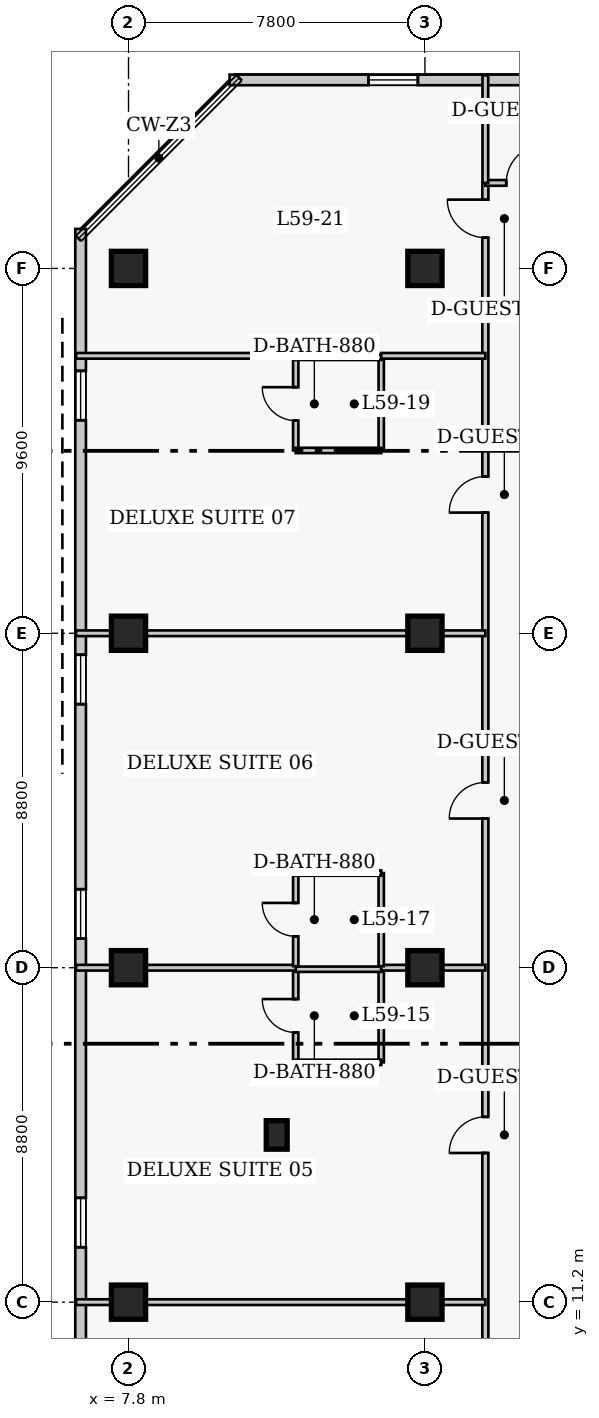
"""IFC4 building model, lengths in metres.
Left out: names, types, materials, properties, quantities, classifications, styles, units other than length and angle.
Written with IfcOpenShell. Run it as: python <this file> out.ifc"""

import sys

from ifc_helpers import new_model, si_unit, direction, frame, frame_2d, origin, origin_2d, place, context, subcontext, project, spatial, rectangle, extrude, element, fill, save


model = new_model("IFC4")
c1 = context("Model", 3, precision=1e-05, world=origin(), true_north=direction((0.0, 1.0)))
c2 = subcontext(c1, "Body", "Model", "MODEL_VIEW")
j1 = project(units=[si_unit("LENGTHUNIT", "METRE"), si_unit("PLANEANGLEUNIT", "RADIAN")], contexts=[c1])
p1 = place(None, origin())
s1 = spatial("IfcSite", under=j1, at=p1, CompositionType="ELEMENT")
p2 = place(p1, origin())
s2 = spatial("IfcBuilding", under=s1, at=p2, CompositionType="ELEMENT")
p3 = place(p2, frame((0.0, 0.0, 236.5)))
s3 = spatial("IfcBuildingStorey", under=s2, at=p3, CompositionType="ELEMENT", Elevation=236.5)
for number, where, z_axis, x_axis in (
    (1, (7.8, 11.2, 0.0), (0.0, 0.0, 1.0), (1.0, 0.0, 0.0)),
    (2, (7.8, 20.0, 0.0), (0.0, 0.0, 1.0), (1.0, 0.0, 0.0)),
    (3, (7.8, 28.8, 0.0), (0.0, 0.0, 1.0), (1.0, 0.0, 0.0)),
    (4, (7.8, 38.4, 0.0), (0.0, 0.0, 1.0), (1.0, 0.0, 0.0)),
    (5, (15.6, 11.2, 0.0), (0.0, 0.0, 1.0), (1.0, 0.0, 0.0)),
    (6, (15.6, 20.0, 0.0), (0.0, 0.0, 1.0), (1.0, 0.0, 0.0)),
    (7, (15.6, 28.8, 0.0), (0.0, 0.0, 1.0), (1.0, 0.0, 0.0)),
    (8, (15.6, 38.4, 0.0), (0.0, 0.0, 1.0), (1.0, 0.0, 0.0)),
):
    element("IfcColumn", number, at=place(p3, frame(where, z_axis=z_axis, x_axis=x_axis)), inside=s3, PredefinedType="COLUMN", context=c2, shape_type="SweptSolid", body=[
        extrude(rectangle(XDim=0.9, YDim=0.9, at=origin_2d()), origin(), (0.0, 0.0, 1.0), 3.9),
    ])
p4 = place(p3, frame((11.7, 15.6, 0.0), z_axis=(0.0, 0.0, 1.0), x_axis=(1.0, 0.0, 0.0)))
e9 = element("IfcColumn", 9, at=p4, inside=s3, PredefinedType="PILASTER", context=c2, shape_type="SweptSolid", body=[
    extrude(rectangle(XDim=0.55, YDim=0.75, at=origin_2d()), origin(), (0.0, 0.0, 1.0), 3.9),
])
p5 = place(p3, frame((36.29, 43.36, 0.0), z_axis=(0.0, 0.0, 1.0), x_axis=(-1.0, 0.0, 0.0)))
e10 = element("IfcWall", 10, at=p5, inside=s3, PredefinedType="SOLIDWALL", context=c2, shape_type="SweptSolid", body=[
    extrude(rectangle(XDim=25.83, YDim=0.28, at=frame_2d((12.915, 0.0))), origin(), (0.0, 0.0, 1.0), 3.52),
])
p6 = place(p5, frame((3.005, 0.0, 0.85)))
e11 = element("IfcOpeningElement", 11, at=p6, cuts=e10, PredefinedType="OPENING", context=c2, shape_type="SweptSolid", body=[
    extrude(rectangle(XDim=1.3, YDim=1.7, at=frame_2d((0.65, 0.85))), frame((0.0, 0.15, 0.0), z_axis=(0.0, -1.0, 0.0), x_axis=(1.0, 0.0, 0.0)), (0.0, 0.0, 1.0), 0.3),
])
p7 = place(p5, frame((12.265, 0.0, 0.85)))
e12 = element("IfcOpeningElement", 12, at=p7, cuts=e10, PredefinedType="OPENING", context=c2, shape_type="SweptSolid", body=[
    extrude(rectangle(XDim=1.3, YDim=1.7, at=frame_2d((0.65, 0.85))), frame((0.0, 0.15, 0.0), z_axis=(0.0, -1.0, 0.0), x_axis=(1.0, 0.0, 0.0)), (0.0, 0.0, 1.0), 0.3),
])
p8 = place(p5, frame((20.875, 0.0, 0.85)))
e13 = element("IfcOpeningElement", 13, at=p8, cuts=e10, PredefinedType="OPENING", context=c2, shape_type="SweptSolid", body=[
    extrude(rectangle(XDim=1.3, YDim=1.7, at=frame_2d((0.65, 0.85))), frame((0.0, 0.15, 0.0), z_axis=(0.0, -1.0, 0.0), x_axis=(1.0, 0.0, 0.0)), (0.0, 0.0, 1.0), 0.3),
])
p9 = place(p3, frame((6.54, 39.44, 0.0), z_axis=(0.0, 0.0, 1.0), x_axis=(0.0, -1.0, 0.0)))
e14 = element("IfcWall", 14, at=p9, inside=s3, PredefinedType="SOLIDWALL", context=c2, shape_type="SweptSolid", body=[
    extrude(rectangle(XDim=29.88, YDim=0.28, at=frame_2d((14.94, 0.0))), origin(), (0.0, 0.0, 1.0), 3.52),
])
p10 = place(p9, frame((3.735, 0.0, 0.85)))
e15 = element("IfcOpeningElement", 15, at=p10, cuts=e14, PredefinedType="OPENING", context=c2, shape_type="SweptSolid", body=[
    extrude(rectangle(XDim=1.3, YDim=1.7, at=frame_2d((0.65, 0.85))), frame((0.0, 0.15, 0.0), z_axis=(0.0, -1.0, 0.0), x_axis=(1.0, 0.0, 0.0)), (0.0, 0.0, 1.0), 0.3),
])
p11 = place(p9, frame((11.205, 0.0, 0.85)))
e16 = element("IfcOpeningElement", 16, at=p11, cuts=e14, PredefinedType="OPENING", context=c2, shape_type="SweptSolid", body=[
    extrude(rectangle(XDim=1.3, YDim=1.7, at=frame_2d((0.65, 0.85))), frame((0.0, 0.15, 0.0), z_axis=(0.0, -1.0, 0.0), x_axis=(1.0, 0.0, 0.0)), (0.0, 0.0, 1.0), 0.3),
])
p12 = place(p9, frame((17.375, 0.0, 0.85)))
e17 = element("IfcOpeningElement", 17, at=p12, cuts=e14, PredefinedType="OPENING", context=c2, shape_type="SweptSolid", body=[
    extrude(rectangle(XDim=1.3, YDim=1.7, at=frame_2d((0.65, 0.85))), frame((0.0, 0.15, 0.0), z_axis=(0.0, -1.0, 0.0), x_axis=(1.0, 0.0, 0.0)), (0.0, 0.0, 1.0), 0.3),
])
p13 = place(p9, frame((25.495, 0.0, 0.85)))
e18 = element("IfcOpeningElement", 18, at=p13, cuts=e14, PredefinedType="OPENING", context=c2, shape_type="SweptSolid", body=[
    extrude(rectangle(XDim=1.3, YDim=1.7, at=frame_2d((0.65, 0.85))), frame((0.0, 0.15, 0.0), z_axis=(0.0, -1.0, 0.0), x_axis=(1.0, 0.0, 0.0)), (0.0, 0.0, 1.0), 0.3),
])
p14 = place(p3, frame((17.19, 7.55, 0.0), z_axis=(0.0, 0.0, 1.0), x_axis=(0.0, 1.0, 0.0)))
e19 = element("IfcWall", 19, at=p14, inside=s3, PredefinedType="PARTITIONING", context=c2, shape_type="SweptSolid", body=[
    extrude(rectangle(XDim=33.1, YDim=0.16, at=frame_2d((16.55, 0.0))), origin(), (0.0, 0.0, 1.0), 3.52),
])
p15 = place(p14, frame((1.35, 0.0, 0.0)))
e20 = element("IfcOpeningElement", 20, at=p15, cuts=e19, PredefinedType="OPENING", context=c2, shape_type="SweptSolid", body=[
    extrude(rectangle(XDim=0.95, YDim=2.1, at=frame_2d((0.475, 1.05))), frame((0.0, 0.09, 0.0), z_axis=(0.0, -1.0, 0.0), x_axis=(1.0, 0.0, 0.0)), (0.0, 0.0, 1.0), 0.18),
])
p16 = place(p14, frame((7.575, 0.0, 0.0)))
e21 = element("IfcOpeningElement", 21, at=p16, cuts=e19, PredefinedType="OPENING", context=c2, shape_type="SweptSolid", body=[
    extrude(rectangle(XDim=0.95, YDim=2.1, at=frame_2d((0.475, 1.05))), frame((0.0, 0.09, 0.0), z_axis=(0.0, -1.0, 0.0), x_axis=(1.0, 0.0, 0.0)), (0.0, 0.0, 1.0), 0.18),
])
p17 = place(p14, frame((16.375, 0.0, 0.0)))
e22 = element("IfcOpeningElement", 22, at=p17, cuts=e19, PredefinedType="OPENING", context=c2, shape_type="SweptSolid", body=[
    extrude(rectangle(XDim=0.95, YDim=2.1, at=frame_2d((0.475, 1.05))), frame((0.0, 0.09, 0.0), z_axis=(0.0, -1.0, 0.0), x_axis=(1.0, 0.0, 0.0)), (0.0, 0.0, 1.0), 0.18),
])
p18 = place(p14, frame((24.425, 0.0, 0.0)))
e23 = element("IfcOpeningElement", 23, at=p18, cuts=e19, PredefinedType="OPENING", context=c2, shape_type="SweptSolid", body=[
    extrude(rectangle(XDim=0.95, YDim=2.1, at=frame_2d((0.475, 1.05))), frame((0.0, 0.09, 0.0), z_axis=(0.0, -1.0, 0.0), x_axis=(1.0, 0.0, 0.0)), (0.0, 0.0, 1.0), 0.18),
])
p19 = place(p14, frame((31.66, 0.0, 0.0)))
e24 = element("IfcOpeningElement", 24, at=p19, cuts=e19, PredefinedType="OPENING", context=c2, shape_type="SweptSolid", body=[
    extrude(rectangle(XDim=1.0, YDim=2.15, at=frame_2d((0.5, 1.075))), frame((0.0, 0.09, 0.0), z_axis=(0.0, -1.0, 0.0), x_axis=(1.0, 0.0, 0.0)), (0.0, 0.0, 1.0), 0.18),
])
p20 = place(p3, frame((17.19, 40.65, 0.0), z_axis=(0.0, 0.0, 1.0), x_axis=(1.0, 0.0, 0.0)))
e25 = element("IfcWall", 25, at=p20, inside=s3, PredefinedType="PARTITIONING", context=c2, shape_type="SweptSolid", body=[
    extrude(rectangle(XDim=4.91, YDim=0.15, at=frame_2d((2.455, 0.0))), origin(), (0.0, 0.0, 1.0), 3.52),
])
p21 = place(p20, frame((0.55, 0.0, 0.0)))
e26 = element("IfcOpeningElement", 26, at=p21, cuts=e25, PredefinedType="OPENING", context=c2, shape_type="SweptSolid", body=[
    extrude(rectangle(XDim=1.0, YDim=2.15, at=frame_2d((0.5, 1.075))), frame((0.0, 0.085, 0.0), z_axis=(0.0, -1.0, 0.0), x_axis=(1.0, 0.0, 0.0)), (0.0, 0.0, 1.0), 0.17),
])
p22 = place(p3, frame((17.19, 40.65, 0.0), z_axis=(0.0, 0.0, 1.0), x_axis=(0.0, 1.0, 0.0)))
e27 = element("IfcWall", 27, at=p22, inside=s3, PredefinedType="PARTITIONING", context=c2, shape_type="SweptSolid", body=[
    extrude(rectangle(XDim=2.83, YDim=0.15, at=frame_2d((1.415, 0.0))), origin(), (0.0, 0.0, 1.0), 3.52),
])
p23 = place(p3, frame((6.42, 11.2, 0.0), z_axis=(0.0, 0.0, 1.0), x_axis=(1.0, 0.0, 0.0)))
e28 = element("IfcWall", 28, at=p23, inside=s3, PredefinedType="PARTITIONING", context=c2, shape_type="SweptSolid", body=[
    extrude(rectangle(XDim=10.77, YDim=0.15, at=frame_2d((5.385, 0.0))), origin(), (0.0, 0.0, 1.0), 2.748),
])
p24 = place(p3, frame((12.2, 17.51, 0.0), z_axis=(0.0, 0.0, 1.0), x_axis=(0.0, 1.0, 0.0)))
e29 = element("IfcWall", 29, at=p24, inside=s3, PredefinedType="PLUMBINGWALL", context=c2, shape_type="SweptSolid", body=[
    extrude(rectangle(XDim=2.45, YDim=0.14, at=frame_2d((1.225, 0.0))), origin(), (0.0, 0.0, 1.0), 3.52),
])
p25 = place(p24, frame((0.785, 0.0, 0.0)))
e30 = element("IfcOpeningElement", 30, at=p25, cuts=e29, PredefinedType="OPENING", context=c2, shape_type="SweptSolid", body=[
    extrude(rectangle(XDim=0.88, YDim=2.05, at=frame_2d((0.44, 1.025))), frame((0.0, 0.08, 0.0), z_axis=(0.0, -1.0, 0.0), x_axis=(1.0, 0.0, 0.0)), (0.0, 0.0, 1.0), 0.16),
])
p26 = place(p3, frame((14.45, 17.51, 0.0), z_axis=(0.0, 0.0, 1.0), x_axis=(0.0, 1.0, 0.0)))
e31 = element("IfcWall", 31, at=p26, inside=s3, PredefinedType="PLUMBINGWALL", context=c2, shape_type="SweptSolid", body=[
    extrude(rectangle(XDim=2.45, YDim=0.14, at=frame_2d((1.225, 0.0))), origin(), (0.0, 0.0, 1.0), 3.52),
])
p27 = place(p3, frame((12.2, 17.51, 0.0), z_axis=(0.0, 0.0, 1.0), x_axis=(1.0, 0.0, 0.0)))
e32 = element("IfcWall", 32, at=p27, inside=s3, PredefinedType="PLUMBINGWALL", context=c2, shape_type="SweptSolid", body=[
    extrude(rectangle(XDim=2.25, YDim=0.14, at=frame_2d((1.125, 0.0))), origin(), (0.0, 0.0, 1.0), 3.52),
])
p28 = place(p3, frame((12.2, 19.96, 0.0), z_axis=(0.0, 0.0, 1.0), x_axis=(1.0, 0.0, 0.0)))
e33 = element("IfcWall", 33, at=p28, inside=s3, PredefinedType="PLUMBINGWALL", context=c2, shape_type="SweptSolid", body=[
    extrude(rectangle(XDim=2.25, YDim=0.14, at=frame_2d((1.125, 0.0))), origin(), (0.0, 0.0, 1.0), 2.908),
])
p29 = place(p3, frame((6.42, 20.0, 0.0), z_axis=(0.0, 0.0, 1.0), x_axis=(1.0, 0.0, 0.0)))
e34 = element("IfcWall", 34, at=p29, inside=s3, PredefinedType="PARTITIONING", context=c2, shape_type="SweptSolid", body=[
    extrude(rectangle(XDim=5.78, YDim=0.15, at=frame_2d((2.89, 0.0))), origin(), (0.0, 0.0, 1.0), 2.748),
])
p30 = place(p3, frame((14.45, 20.0, 0.0), z_axis=(0.0, 0.0, 1.0), x_axis=(1.0, 0.0, 0.0)))
e35 = element("IfcWall", 35, at=p30, inside=s3, PredefinedType="PARTITIONING", context=c2, shape_type="SweptSolid", body=[
    extrude(rectangle(XDim=2.74, YDim=0.15, at=frame_2d((1.37, 0.0))), origin(), (0.0, 0.0, 1.0), 2.748),
])
p31 = place(p3, frame((12.2, 20.04, 0.0), z_axis=(0.0, 0.0, 1.0), x_axis=(0.0, 1.0, 0.0)))
e36 = element("IfcWall", 36, at=p31, inside=s3, PredefinedType="PLUMBINGWALL", context=c2, shape_type="SweptSolid", body=[
    extrude(rectangle(XDim=2.45, YDim=0.14, at=frame_2d((1.225, 0.0))), origin(), (0.0, 0.0, 1.0), 3.52),
])
p32 = place(p31, frame((0.785, 0.0, 0.0)))
e37 = element("IfcOpeningElement", 37, at=p32, cuts=e36, PredefinedType="OPENING", context=c2, shape_type="SweptSolid", body=[
    extrude(rectangle(XDim=0.88, YDim=2.05, at=frame_2d((0.44, 1.025))), frame((0.0, 0.08, 0.0), z_axis=(0.0, -1.0, 0.0), x_axis=(1.0, 0.0, 0.0)), (0.0, 0.0, 1.0), 0.16),
])
p33 = place(p3, frame((14.45, 20.04, 0.0), z_axis=(0.0, 0.0, 1.0), x_axis=(0.0, 1.0, 0.0)))
e38 = element("IfcWall", 38, at=p33, inside=s3, PredefinedType="PLUMBINGWALL", context=c2, shape_type="SweptSolid", body=[
    extrude(rectangle(XDim=2.45, YDim=0.14, at=frame_2d((1.225, 0.0))), origin(), (0.0, 0.0, 1.0), 3.52),
])
p34 = place(p3, frame((12.2, 22.49, 0.0), z_axis=(0.0, 0.0, 1.0), x_axis=(1.0, 0.0, 0.0)))
e39 = element("IfcWall", 39, at=p34, inside=s3, PredefinedType="PLUMBINGWALL", context=c2, shape_type="SweptSolid", body=[
    extrude(rectangle(XDim=2.25, YDim=0.14, at=frame_2d((1.125, 0.0))), origin(), (0.0, 0.0, 1.0), 3.52),
])
p35 = place(p3, frame((6.42, 28.8, 0.0), z_axis=(0.0, 0.0, 1.0), x_axis=(1.0, 0.0, 0.0)))
e40 = element("IfcWall", 40, at=p35, inside=s3, PredefinedType="PARTITIONING", context=c2, shape_type="SweptSolid", body=[
    extrude(rectangle(XDim=10.77, YDim=0.15, at=frame_2d((5.385, 0.0))), origin(), (0.0, 0.0, 1.0), 2.748),
])
p36 = place(p3, frame((12.2, 33.61, 0.0), z_axis=(0.0, 0.0, 1.0), x_axis=(0.0, 1.0, 0.0)))
e41 = element("IfcWall", 41, at=p36, inside=s3, PredefinedType="PLUMBINGWALL", context=c2, shape_type="SweptSolid", body=[
    extrude(rectangle(XDim=2.45, YDim=0.14, at=frame_2d((1.225, 0.0))), origin(), (0.0, 0.0, 1.0), 3.52),
])
p37 = place(p36, frame((0.785, 0.0, 0.0)))
e42 = element("IfcOpeningElement", 42, at=p37, cuts=e41, PredefinedType="OPENING", context=c2, shape_type="SweptSolid", body=[
    extrude(rectangle(XDim=0.88, YDim=2.05, at=frame_2d((0.44, 1.025))), frame((0.0, 0.08, 0.0), z_axis=(0.0, -1.0, 0.0), x_axis=(1.0, 0.0, 0.0)), (0.0, 0.0, 1.0), 0.16),
])
p38 = place(p3, frame((14.45, 33.61, 0.0), z_axis=(0.0, 0.0, 1.0), x_axis=(0.0, 1.0, 0.0)))
e43 = element("IfcWall", 43, at=p38, inside=s3, PredefinedType="PLUMBINGWALL", context=c2, shape_type="SweptSolid", body=[
    extrude(rectangle(XDim=2.45, YDim=0.14, at=frame_2d((1.225, 0.0))), origin(), (0.0, 0.0, 1.0), 3.52),
])
for number, where, z_axis, x_axis in (
    (44, (12.2, 33.61, 0.0), (0.0, 0.0, 1.0), (1.0, 0.0, 0.0)),
    (45, (12.2, 36.06, 0.0), (0.0, 0.0, 1.0), (1.0, 0.0, 0.0)),
):
    element("IfcWall", number, at=place(p3, frame(where, z_axis=z_axis, x_axis=x_axis)), inside=s3, PredefinedType="PLUMBINGWALL", context=c2, shape_type="SweptSolid", body=[
        extrude(rectangle(XDim=2.25, YDim=0.14, at=frame_2d((1.125, 0.0))), origin(), (0.0, 0.0, 1.0), 3.52),
    ])
p39 = place(p3, frame((6.42, 36.1, 0.0), z_axis=(0.0, 0.0, 1.0), x_axis=(1.0, 0.0, 0.0)))
e46 = element("IfcWall", 46, at=p39, inside=s3, PredefinedType="PARTITIONING", context=c2, shape_type="SweptSolid", body=[
    extrude(rectangle(XDim=5.78, YDim=0.15, at=frame_2d((2.89, 0.0))), origin(), (0.0, 0.0, 1.0), 3.52),
])
p40 = place(p3, frame((14.45, 36.1, 0.0), z_axis=(0.0, 0.0, 1.0), x_axis=(1.0, 0.0, 0.0)))
e47 = element("IfcWall", 47, at=p40, inside=s3, PredefinedType="PARTITIONING", context=c2, shape_type="SweptSolid", body=[
    extrude(rectangle(XDim=2.74, YDim=0.15, at=frame_2d((1.37, 0.0))), origin(), (0.0, 0.0, 1.0), 3.52),
])
p41 = place(p8, origin())
e48 = element("IfcWindow", 48, at=p41, inside=s3, PartitioningType="SINGLE_PANEL", PredefinedType="WINDOW", context=c2, shape_type="SweptSolid", body=[
    extrude(rectangle(XDim=1.3, YDim=1.7, at=frame_2d((0.65, 0.85))), frame((0.0, 0.03, 0.0), z_axis=(0.0, -1.0, 0.0), x_axis=(1.0, 0.0, 0.0)), (0.0, 0.0, 1.0), 0.06),
])
fill(e13, e48)
p42 = place(p10, origin())
e49 = element("IfcWindow", 49, at=p42, inside=s3, PartitioningType="SINGLE_PANEL", PredefinedType="WINDOW", context=c2, shape_type="SweptSolid", body=[
    extrude(rectangle(XDim=1.3, YDim=1.7, at=frame_2d((0.65, 0.85))), frame((0.0, 0.03, 0.0), z_axis=(0.0, -1.0, 0.0), x_axis=(1.0, 0.0, 0.0)), (0.0, 0.0, 1.0), 0.06),
])
fill(e15, e49)
p43 = place(p11, origin())
e50 = element("IfcWindow", 50, at=p43, inside=s3, PartitioningType="SINGLE_PANEL", PredefinedType="WINDOW", context=c2, shape_type="SweptSolid", body=[
    extrude(rectangle(XDim=1.3, YDim=1.7, at=frame_2d((0.65, 0.85))), frame((0.0, 0.03, 0.0), z_axis=(0.0, -1.0, 0.0), x_axis=(1.0, 0.0, 0.0)), (0.0, 0.0, 1.0), 0.06),
])
fill(e16, e50)
p44 = place(p12, origin())
e51 = element("IfcWindow", 51, at=p44, inside=s3, PartitioningType="SINGLE_PANEL", PredefinedType="WINDOW", context=c2, shape_type="SweptSolid", body=[
    extrude(rectangle(XDim=1.3, YDim=1.7, at=frame_2d((0.65, 0.85))), frame((0.0, 0.03, 0.0), z_axis=(0.0, -1.0, 0.0), x_axis=(1.0, 0.0, 0.0)), (0.0, 0.0, 1.0), 0.06),
])
fill(e17, e51)
p45 = place(p13, origin())
e52 = element("IfcWindow", 52, at=p45, inside=s3, PartitioningType="SINGLE_PANEL", PredefinedType="WINDOW", context=c2, shape_type="SweptSolid", body=[
    extrude(rectangle(XDim=1.3, YDim=1.7, at=frame_2d((0.65, 0.85))), frame((0.0, 0.03, 0.0), z_axis=(0.0, -1.0, 0.0), x_axis=(1.0, 0.0, 0.0)), (0.0, 0.0, 1.0), 0.06),
])
fill(e18, e52)
p46 = place(p21, origin())
e53 = element("IfcDoor", 53, at=p46, inside=s3, OperationType="SINGLE_SWING_RIGHT", PredefinedType="DOOR", context=c2, shape_type="SweptSolid", body=[
    extrude(rectangle(XDim=1.0, YDim=2.15, at=frame_2d((0.5, 1.075))), frame((0.0, 0.025, 0.0), z_axis=(0.0, -1.0, 0.0), x_axis=(1.0, 0.0, 0.0)), (0.0, 0.0, 1.0), 0.05),
])
fill(e26, e53)
p47 = place(p25, origin())
e54 = element("IfcDoor", 54, at=p47, inside=s3, OperationType="SINGLE_SWING_RIGHT", PredefinedType="DOOR", context=c2, shape_type="SweptSolid", body=[
    extrude(rectangle(XDim=0.88, YDim=2.05, at=frame_2d((0.44, 1.025))), frame((0.0, 0.025, 0.0), z_axis=(0.0, -1.0, 0.0), x_axis=(1.0, 0.0, 0.0)), (0.0, 0.0, 1.0), 0.05),
])
fill(e30, e54)
p48 = place(p16, origin())
e55 = element("IfcDoor", 55, at=p48, inside=s3, OperationType="SINGLE_SWING_LEFT", PredefinedType="DOOR", context=c2, shape_type="SweptSolid", body=[
    extrude(rectangle(XDim=0.95, YDim=2.1, at=frame_2d((0.475, 1.05))), frame((0.0, 0.025, 0.0), z_axis=(0.0, -1.0, 0.0), x_axis=(1.0, 0.0, 0.0)), (0.0, 0.0, 1.0), 0.05),
])
fill(e21, e55)
p49 = place(p32, origin())
e56 = element("IfcDoor", 56, at=p49, inside=s3, OperationType="SINGLE_SWING_RIGHT", PredefinedType="DOOR", context=c2, shape_type="SweptSolid", body=[
    extrude(rectangle(XDim=0.88, YDim=2.05, at=frame_2d((0.44, 1.025))), frame((0.0, 0.025, 0.0), z_axis=(0.0, -1.0, 0.0), x_axis=(1.0, 0.0, 0.0)), (0.0, 0.0, 1.0), 0.05),
])
fill(e37, e56)
p50 = place(p17, origin())
e57 = element("IfcDoor", 57, at=p50, inside=s3, OperationType="SINGLE_SWING_LEFT", PredefinedType="DOOR", context=c2, shape_type="SweptSolid", body=[
    extrude(rectangle(XDim=0.95, YDim=2.1, at=frame_2d((0.475, 1.05))), frame((0.0, 0.025, 0.0), z_axis=(0.0, -1.0, 0.0), x_axis=(1.0, 0.0, 0.0)), (0.0, 0.0, 1.0), 0.05),
])
fill(e22, e57)
p51 = place(p37, origin())
e58 = element("IfcDoor", 58, at=p51, inside=s3, OperationType="SINGLE_SWING_RIGHT", PredefinedType="DOOR", context=c2, shape_type="SweptSolid", body=[
    extrude(rectangle(XDim=0.88, YDim=2.05, at=frame_2d((0.44, 1.025))), frame((0.0, 0.025, 0.0), z_axis=(0.0, -1.0, 0.0), x_axis=(1.0, 0.0, 0.0)), (0.0, 0.0, 1.0), 0.05),
])
fill(e42, e58)
p52 = place(p18, origin())
e59 = element("IfcDoor", 59, at=p52, inside=s3, OperationType="SINGLE_SWING_LEFT", PredefinedType="DOOR", context=c2, shape_type="SweptSolid", body=[
    extrude(rectangle(XDim=0.95, YDim=2.1, at=frame_2d((0.475, 1.05))), frame((0.0, 0.025, 0.0), z_axis=(0.0, -1.0, 0.0), x_axis=(1.0, 0.0, 0.0)), (0.0, 0.0, 1.0), 0.05),
])
fill(e23, e59)
p53 = place(p19, origin())
e60 = element("IfcDoor", 60, at=p53, inside=s3, OperationType="SINGLE_SWING_RIGHT", PredefinedType="DOOR", context=c2, shape_type="SweptSolid", body=[
    extrude(rectangle(XDim=1.0, YDim=2.15, at=frame_2d((0.5, 1.075))), frame((0.0, 0.025, 0.0), z_axis=(0.0, -1.0, 0.0), x_axis=(1.0, 0.0, 0.0)), (0.0, 0.0, 1.0), 0.05),
])
fill(e24, e60)
save(model, sys.argv[1])
